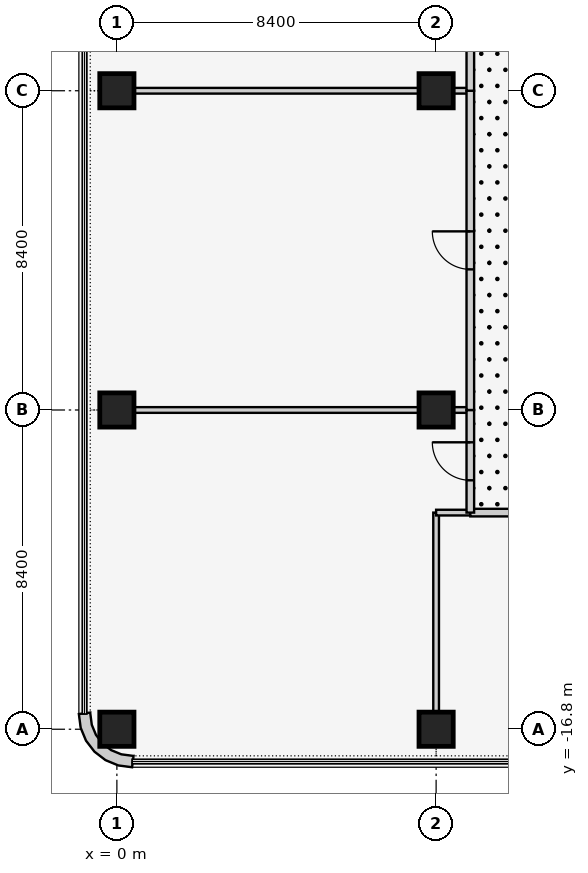
"""IFC4 building model, lengths in metres.
Left out: names, types, materials, properties, quantities, classifications, styles, units other than length and angle.
Written with IfcOpenShell. Run it as: python <this file> out.ifc"""

import sys

from ifc_helpers import new_model, si_unit, direction, frame, frame_2d, origin, origin_2d, place, context, subcontext, project, spatial, polyline, rectangle, outline, extrude, element, fill, save


model = new_model("IFC4")
c1 = context("Model", 3, precision=1e-05, world=origin(), true_north=direction((0.0, 1.0)))
c2 = subcontext(c1, "Body", "Model", "MODEL_VIEW")
j1 = project(units=[si_unit("LENGTHUNIT", "METRE"), si_unit("PLANEANGLEUNIT", "RADIAN")], contexts=[c1])
p1 = place(None, origin())
s1 = spatial("IfcSite", under=j1, at=p1, CompositionType="ELEMENT")
p2 = place(p1, origin())
s2 = spatial("IfcBuilding", under=s1, at=p2, CompositionType="ELEMENT")
p3 = place(p2, frame((0.0, 0.0, 6.0)))
s3 = spatial("IfcBuildingStorey", under=s2, at=p3, CompositionType="ELEMENT", Elevation=6.0)
for number, where, z_axis, x_axis in (
    (1, (0.0, -16.8, 0.0), (0.0, 0.0, 1.0), (1.0, 0.0, 0.0)),
    (2, (0.0, -8.4, 0.0), (0.0, 0.0, 1.0), (1.0, 0.0, 0.0)),
    (3, (0.0, 0.0, 0.0), (0.0, 0.0, 1.0), (1.0, 0.0, 0.0)),
    (4, (8.4, -16.8, 0.0), (0.0, 0.0, 1.0), (1.0, 0.0, 0.0)),
    (5, (8.4, -8.4, 0.0), (0.0, 0.0, 1.0), (1.0, 0.0, 0.0)),
    (6, (8.4, 0.0, 0.0), (0.0, 0.0, 1.0), (1.0, 0.0, 0.0)),
):
    element("IfcColumn", number, at=place(p3, frame(where, z_axis=z_axis, x_axis=x_axis)), inside=s3, PredefinedType="COLUMN", context=c2, shape_type="SweptSolid", body=[
        extrude(rectangle(XDim=0.9, YDim=0.9, at=origin_2d()), origin(), (0.0, 0.0, 1.0), 4.5),
    ])
p4 = place(p3, frame((-0.848, -16.355, 0.0), z_axis=(0.0, 0.0, 1.0), x_axis=(-0.707106781187, -0.707106781187, 0.0)))
e7 = element("IfcWall", 7, at=p4, inside=s3, PredefinedType="SOLIDWALL", context=c2, shape_type="SweptSolid", body=[
    extrude(outline(polyline([(0.139, 1.904), (-0.101, 1.72), (-0.087, 1.706), (0.1, 1.463), (0.209, 1.198), (0.247, 0.914), (0.209, 0.63), (0.1, 0.365), (-0.087, 0.122), (-0.101, 0.108), (0.139, -0.076), (0.362, 0.214), (0.502, 0.552), (0.549, 0.914), (0.502, 1.276), (0.362, 1.614), (0.139, 1.904)])), origin(), (0.0, 0.0, 1.0), 4.3),
])
p5 = place(p3, frame((8.4, -16.35, 0.0), z_axis=(0.0, 0.0, 1.0), x_axis=(0.0, 1.0, 0.0)))
e8 = element("IfcWall", 8, at=p5, inside=s3, PredefinedType="PARTITIONING", context=c2, shape_type="SweptSolid", body=[
    extrude(rectangle(XDim=5.25, YDim=0.15, at=frame_2d((2.625, 0.0))), origin(), (0.0, 0.0, 1.0), 3.543),
])
p6 = place(p3, frame((8.4, -11.1, 0.0), z_axis=(0.0, 0.0, 1.0), x_axis=(1.0, 0.0, 0.0)))
e9 = element("IfcWall", 9, at=p6, inside=s3, PredefinedType="PARTITIONING", context=c2, shape_type="SweptSolid", body=[
    extrude(rectangle(XDim=0.9, YDim=0.15, at=frame_2d((0.45, 0.0))), origin(), (0.0, 0.0, 1.0), 4.3),
])
p7 = place(p3, frame((9.3, -11.1, 0.0), z_axis=(0.0, 0.0, 1.0), x_axis=(1.0, 0.0, 0.0)))
e10 = element("IfcWall", 10, at=p7, inside=s3, PredefinedType="PARTITIONING", context=c2, shape_type="SweptSolid", body=[
    extrude(rectangle(XDim=2.4, YDim=0.2, at=frame_2d((1.2, 0.0))), origin(), (0.0, 0.0, 1.0), 4.3),
])
p8 = place(p3, frame((0.45, -8.4, 0.0), z_axis=(0.0, 0.0, 1.0), x_axis=(1.0, 0.0, 0.0)))
e11 = element("IfcWall", 11, at=p8, inside=s3, PredefinedType="PARTITIONING", context=c2, shape_type="SweptSolid", body=[
    extrude(rectangle(XDim=7.5, YDim=0.15, at=frame_2d((3.75, 0.0))), origin(), (0.0, 0.0, 1.0), 3.543),
])
p9 = place(p3, frame((8.85, -8.4, 0.0), z_axis=(0.0, 0.0, 1.0), x_axis=(1.0, 0.0, 0.0)))
e12 = element("IfcWall", 12, at=p9, inside=s3, PredefinedType="PARTITIONING", context=c2, shape_type="SweptSolid", body=[
    extrude(rectangle(XDim=0.45, YDim=0.15, at=frame_2d((0.225, 0.0))), origin(), (0.0, 0.0, 1.0), 3.543),
])
p10 = place(p3, frame((9.3, -8.4, 0.0), z_axis=(0.0, 0.0, 1.0), x_axis=(0.0, -1.0, 0.0)))
e13 = element("IfcWall", 13, at=p10, inside=s3, PredefinedType="PARTITIONING", context=c2, shape_type="SweptSolid", body=[
    extrude(rectangle(XDim=2.7, YDim=0.2, at=frame_2d((1.35, 0.0))), origin(), (0.0, 0.0, 1.0), 4.3),
])
p11 = place(p10, frame((0.85, 0.0, 0.0)))
e14 = element("IfcOpeningElement", 14, at=p11, cuts=e13, PredefinedType="OPENING", context=c2, shape_type="SweptSolid", body=[
    extrude(rectangle(XDim=1.0, YDim=2.1, at=frame_2d((0.5, 1.05))), frame((0.0, 0.11, 0.0), z_axis=(0.0, -1.0, 0.0), x_axis=(1.0, 0.0, 0.0)), (0.0, 0.0, 1.0), 0.22),
])
p12 = place(p3, frame((0.45, 0.0, 0.0), z_axis=(0.0, 0.0, 1.0), x_axis=(1.0, 0.0, 0.0)))
e15 = element("IfcWall", 15, at=p12, inside=s3, PredefinedType="PARTITIONING", context=c2, shape_type="SweptSolid", body=[
    extrude(rectangle(XDim=7.5, YDim=0.15, at=frame_2d((3.75, 0.0))), origin(), (0.0, 0.0, 1.0), 3.543),
])
p13 = place(p3, frame((8.85, 0.0, 0.0), z_axis=(0.0, 0.0, 1.0), x_axis=(1.0, 0.0, 0.0)))
e16 = element("IfcWall", 16, at=p13, inside=s3, PredefinedType="PARTITIONING", context=c2, shape_type="SweptSolid", body=[
    extrude(rectangle(XDim=0.45, YDim=0.15, at=frame_2d((0.225, 0.0))), origin(), (0.0, 0.0, 1.0), 3.543),
])
p14 = place(p3, frame((9.3, 0.0, 0.0), z_axis=(0.0, 0.0, 1.0), x_axis=(0.0, -1.0, 0.0)))
e17 = element("IfcWall", 17, at=p14, inside=s3, PredefinedType="PARTITIONING", context=c2, shape_type="SweptSolid", body=[
    extrude(rectangle(XDim=8.4, YDim=0.2, at=frame_2d((4.2, 0.0))), origin(), (0.0, 0.0, 1.0), 4.3),
])
p15 = place(p14, frame((3.7, 0.0, 0.0)))
e18 = element("IfcOpeningElement", 18, at=p15, cuts=e17, PredefinedType="OPENING", context=c2, shape_type="SweptSolid", body=[
    extrude(rectangle(XDim=1.0, YDim=2.1, at=frame_2d((0.5, 1.05))), frame((0.0, 0.11, 0.0), z_axis=(0.0, -1.0, 0.0), x_axis=(1.0, 0.0, 0.0)), (0.0, 0.0, 1.0), 0.22),
])
p16 = place(p3, frame((9.3, 8.4, 0.0), z_axis=(0.0, 0.0, 1.0), x_axis=(0.0, -1.0, 0.0)))
e19 = element("IfcWall", 19, at=p16, inside=s3, PredefinedType="PARTITIONING", context=c2, shape_type="SweptSolid", body=[
    extrude(rectangle(XDim=8.4, YDim=0.2, at=frame_2d((4.2, 0.0))), origin(), (0.0, 0.0, 1.0), 4.3),
])
p17 = place(p16, frame((3.7, 0.0, 0.0)))
e20 = element("IfcOpeningElement", 20, at=p17, cuts=e19, PredefinedType="OPENING", context=c2, shape_type="SweptSolid", body=[
    extrude(rectangle(XDim=1.0, YDim=2.1, at=frame_2d((0.5, 1.05))), frame((0.0, 0.11, 0.0), z_axis=(0.0, -1.0, 0.0), x_axis=(1.0, 0.0, 0.0)), (0.0, 0.0, 1.0), 0.22),
])
p18 = place(p11, frame((1.0, 0.0, 0.0), z_axis=(0.0, 0.0, 1.0), x_axis=(-1.0, 0.0, 0.0)))
e21 = element("IfcDoor", 21, at=p18, inside=s3, OperationType="SINGLE_SWING_RIGHT", PredefinedType="DOOR", context=c2, shape_type="SweptSolid", body=[
    extrude(rectangle(XDim=1.0, YDim=2.1, at=frame_2d((0.5, 1.05))), frame((0.0, 0.025, 0.0), z_axis=(0.0, -1.0, 0.0), x_axis=(1.0, 0.0, 0.0)), (0.0, 0.0, 1.0), 0.05),
])
fill(e14, e21)
p19 = place(p15, frame((1.0, 0.0, 0.0), z_axis=(0.0, 0.0, 1.0), x_axis=(-1.0, 0.0, 0.0)))
e22 = element("IfcDoor", 22, at=p19, inside=s3, OperationType="SINGLE_SWING_RIGHT", PredefinedType="DOOR", context=c2, shape_type="SweptSolid", body=[
    extrude(rectangle(XDim=1.0, YDim=2.1, at=frame_2d((0.5, 1.05))), frame((0.0, 0.025, 0.0), z_axis=(0.0, -1.0, 0.0), x_axis=(1.0, 0.0, 0.0)), (0.0, 0.0, 1.0), 0.05),
])
fill(e18, e22)
save(model, sys.argv[1])
